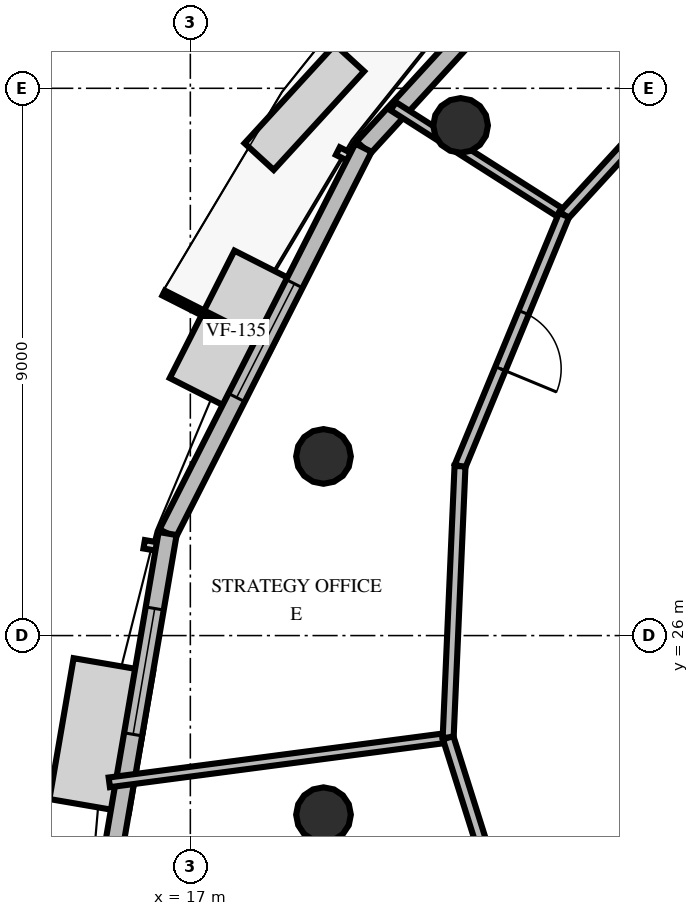
"""IFC4 building model, lengths in metres.
Left out: names, types, materials, properties, quantities, classifications, styles, units other than length and angle.
Written with IfcOpenShell. Run it as: python <this file> out.ifc"""

import sys

from ifc_helpers import new_model, si_unit, direction, frame, frame_2d, origin, origin_2d, place, context, subcontext, project, spatial, rectangle, circle, extrude, element, fill, save


model = new_model("IFC4")
c1 = context("Model", 3, precision=1e-05, world=origin(), true_north=direction((0.0, 1.0)))
c2 = subcontext(c1, "Body", "Model", "MODEL_VIEW")
j1 = project(units=[si_unit("LENGTHUNIT", "METRE"), si_unit("PLANEANGLEUNIT", "RADIAN")], contexts=[c1])
p1 = place(None, origin())
s1 = spatial("IfcSite", under=j1, at=p1, CompositionType="ELEMENT")
p2 = place(p1, origin())
s2 = spatial("IfcBuilding", under=s1, at=p2, CompositionType="ELEMENT")
p3 = place(p2, frame((0.0, 0.0, 230.4)))
s3 = spatial("IfcBuildingStorey", under=s2, at=p3, CompositionType="ELEMENT", Elevation=230.4)
for number, where, z_axis, x_axis in (
    (1, (21.445, 34.389, -0.22), (0.0, 0.0, 1.0), (1.0, 0.0, 0.0)),
    (2, (19.19, 28.946, -0.22), (0.0, 0.0, 1.0), (1.0, 0.0, 0.0)),
    (3, (19.19, 23.054, -0.22), (0.0, 0.0, 1.0), (1.0, 0.0, 0.0)),
):
    element("IfcColumn", number, at=place(p3, frame(where, z_axis=z_axis, x_axis=x_axis)), inside=s3, PredefinedType="COLUMN", context=c2, shape_type="SweptSolid", body=[
        extrude(circle(Radius=0.45, at=origin_2d()), origin(), (0.0, 0.0, 1.0), 3.82),
    ])
p4 = place(p3, frame((24.774, 39.4, 0.0), z_axis=(0.0, 0.0, 1.0), x_axis=(-0.675568478711, -0.737297247094, 0.0)))
e4 = element("IfcWall", 4, at=p4, inside=s3, PredefinedType="SOLIDWALL", context=c2, shape_type="SweptSolid", body=[
    extrude(rectangle(XDim=7.293, YDim=0.3, at=frame_2d((3.646, 0.0))), origin(), (0.0, 0.0, 1.0), 2.76),
])
p5 = place(p4, frame((2.43, 0.0, 0.0)))
e5 = element("IfcOpeningElement", 5, at=p5, cuts=e4, PredefinedType="OPENING", context=c2, shape_type="SweptSolid", body=[
    extrude(rectangle(XDim=1.05, YDim=2.15, at=frame_2d((0.525, 1.075))), frame((0.0, 0.16, 0.0), z_axis=(0.0, -1.0, 0.0), x_axis=(1.0, 0.0, 0.0)), (0.0, 0.0, 1.0), 0.32),
])
p6 = place(p3, frame((19.847, 34.023, 0.0), z_axis=(0.0, 0.0, 1.0), x_axis=(-0.452571902959, -0.891727914025, 0.0)))
e6 = element("IfcWall", 6, at=p6, inside=s3, PredefinedType="SOLIDWALL", context=c2, shape_type="SweptSolid", body=[
    extrude(rectangle(XDim=7.115, YDim=0.3, at=frame_2d((3.558, 0.0))), origin(), (0.0, 0.0, 1.0), 2.76),
])
p7 = place(p6, frame((2.508, 0.0, 0.8)))
e7 = element("IfcOpeningElement", 7, at=p7, cuts=e6, PredefinedType="OPENING", context=c2, shape_type="SweptSolid", body=[
    extrude(rectangle(XDim=2.1, YDim=1.85, at=frame_2d((1.05, 0.925))), frame((0.0, 0.16, 0.0), z_axis=(0.0, -1.0, 0.0), x_axis=(1.0, 0.0, 0.0)), (0.0, 0.0, 1.0), 0.32),
])
p8 = place(p3, frame((16.626, 27.678, 0.0), z_axis=(0.0, 0.0, 1.0), x_axis=(-0.169313685925, -0.985562213033, 0.0)))
e8 = element("IfcWall", 8, at=p8, inside=s3, PredefinedType="SOLIDWALL", context=c2, shape_type="SweptSolid", body=[
    extrude(rectangle(XDim=6.643, YDim=0.3, at=frame_2d((3.322, 0.0))), origin(), (0.0, 0.0, 1.0), 2.76),
])
p9 = place(p8, frame((1.251, 0.0, 0.8)))
e9 = element("IfcOpeningElement", 9, at=p9, cuts=e8, PredefinedType="OPENING", context=c2, shape_type="SweptSolid", body=[
    extrude(rectangle(XDim=2.1, YDim=1.85, at=frame_2d((1.05, 0.925))), frame((0.0, 0.16, 0.0), z_axis=(0.0, -1.0, 0.0), x_axis=(1.0, 0.0, 0.0)), (0.0, 0.0, 1.0), 0.32),
])
p10 = place(p3, frame((23.146, 32.915, 0.0), z_axis=(0.0, 0.0, 1.0), x_axis=(-0.843383723395, 0.537311729922, 0.0)))
e10 = element("IfcWall", 10, at=p10, inside=s3, PredefinedType="PARTITIONING", context=c2, shape_type="SweptSolid", body=[
    extrude(rectangle(XDim=3.331, YDim=0.16, at=frame_2d((1.666, 0.0))), origin(), (0.0, 0.0, 1.0), 2.46),
])
p11 = place(p3, frame((26.165, 36.21, 0.0), z_axis=(0.0, 0.0, 1.0), x_axis=(-0.675600949954, -0.737267493126, 0.0)))
e11 = element("IfcWall", 11, at=p11, inside=s3, PredefinedType="PARTITIONING", context=c2, shape_type="SweptSolid", body=[
    extrude(rectangle(XDim=4.47, YDim=0.18, at=frame_2d((2.235, 0.0))), origin(), (0.0, 0.0, 1.0), 2.46),
])
p12 = place(p11, frame((0.942, 0.0, 0.0)))
e12 = element("IfcOpeningElement", 12, at=p12, cuts=e11, PredefinedType="OPENING", context=c2, shape_type="SweptSolid", body=[
    extrude(rectangle(XDim=1.0, YDim=2.15, at=frame_2d((0.5, 1.075))), frame((0.0, 0.1, 0.0), z_axis=(0.0, -1.0, 0.0), x_axis=(1.0, 0.0, 0.0)), (0.0, 0.0, 1.0), 0.2),
])
p13 = place(p3, frame((21.24, 24.32, 0.0), z_axis=(0.0, 0.0, 1.0), x_axis=(-0.991446162856, -0.130516306102, 0.0)))
e13 = element("IfcWall", 13, at=p13, inside=s3, PredefinedType="PARTITIONING", context=c2, shape_type="SweptSolid", body=[
    extrude(rectangle(XDim=5.621, YDim=0.16, at=frame_2d((2.811, 0.0))), origin(), (0.0, 0.0, 1.0), 2.46),
])
p14 = place(p3, frame((23.146, 32.915, 0.0), z_axis=(0.0, 0.0, 1.0), x_axis=(-0.382683050338, -0.923879690752, 0.0)))
e14 = element("IfcWall", 14, at=p14, inside=s3, PredefinedType="PARTITIONING", context=c2, shape_type="SweptSolid", body=[
    extrude(rectangle(XDim=4.47, YDim=0.18, at=frame_2d((2.235, 0.0))), origin(), (0.0, 0.0, 1.0), 2.46),
])
p15 = place(p14, frame((1.735, 0.0, 0.0)))
e15 = element("IfcOpeningElement", 15, at=p15, cuts=e14, PredefinedType="OPENING", context=c2, shape_type="SweptSolid", body=[
    extrude(rectangle(XDim=1.0, YDim=2.15, at=frame_2d((0.5, 1.075))), frame((0.0, 0.1, 0.0), z_axis=(0.0, -1.0, 0.0), x_axis=(1.0, 0.0, 0.0)), (0.0, 0.0, 1.0), 0.2),
])
p16 = place(p3, frame((21.435, 28.786, 0.0), z_axis=(0.0, 0.0, 1.0), x_axis=(-0.043641067876, -0.999047274755, 0.0)))
e16 = element("IfcWall", 16, at=p16, inside=s3, PredefinedType="PARTITIONING", context=c2, shape_type="SweptSolid", body=[
    extrude(rectangle(XDim=4.47, YDim=0.18, at=frame_2d((2.235, 0.0))), origin(), (0.0, 0.0, 1.0), 2.46),
])
p17 = place(p3, frame((21.24, 24.32, 0.0), z_axis=(0.0, 0.0, 1.0), x_axis=(0.300749676553, -0.953703115258, 0.0)))
e17 = element("IfcWall", 17, at=p17, inside=s3, PredefinedType="PARTITIONING", context=c2, shape_type="SweptSolid", body=[
    extrude(rectangle(XDim=4.47, YDim=0.18, at=frame_2d((2.235, 0.0))), origin(), (0.0, 0.0, 1.0), 2.46),
])
p18 = place(p17, frame((2.527, 0.0, 0.0)))
e18 = element("IfcOpeningElement", 18, at=p18, cuts=e17, PredefinedType="OPENING", context=c2, shape_type="SweptSolid", body=[
    extrude(rectangle(XDim=1.0, YDim=2.15, at=frame_2d((0.5, 1.075))), frame((0.0, 0.1, 0.0), z_axis=(0.0, -1.0, 0.0), x_axis=(1.0, 0.0, 0.0)), (0.0, 0.0, 1.0), 0.2),
])
p19 = place(p7, origin())
e19 = element("IfcWindow", 19, at=p19, inside=s3, PartitioningType="SINGLE_PANEL", PredefinedType="WINDOW", context=c2, shape_type="SweptSolid", body=[
    extrude(rectangle(XDim=2.1, YDim=1.85, at=frame_2d((1.05, 0.925))), frame((0.0, 0.03, 0.0), z_axis=(0.0, -1.0, 0.0), x_axis=(1.0, 0.0, 0.0)), (0.0, 0.0, 1.0), 0.06),
])
fill(e7, e19)
p20 = place(p9, origin())
e20 = element("IfcWindow", 20, at=p20, inside=s3, PartitioningType="SINGLE_PANEL", PredefinedType="WINDOW", context=c2, shape_type="SweptSolid", body=[
    extrude(rectangle(XDim=2.1, YDim=1.85, at=frame_2d((1.05, 0.925))), frame((0.0, 0.03, 0.0), z_axis=(0.0, -1.0, 0.0), x_axis=(1.0, 0.0, 0.0)), (0.0, 0.0, 1.0), 0.06),
])
fill(e9, e20)
p21 = place(p15, origin())
e21 = element("IfcDoor", 21, at=p21, inside=s3, OperationType="SINGLE_SWING_RIGHT", PredefinedType="DOOR", context=c2, shape_type="SweptSolid", body=[
    extrude(rectangle(XDim=1.0, YDim=2.15, at=frame_2d((0.5, 1.075))), frame((0.0, 0.025, 0.0), z_axis=(0.0, -1.0, 0.0), x_axis=(1.0, 0.0, 0.0)), (0.0, 0.0, 1.0), 0.05),
])
fill(e15, e21)
save(model, sys.argv[1])
